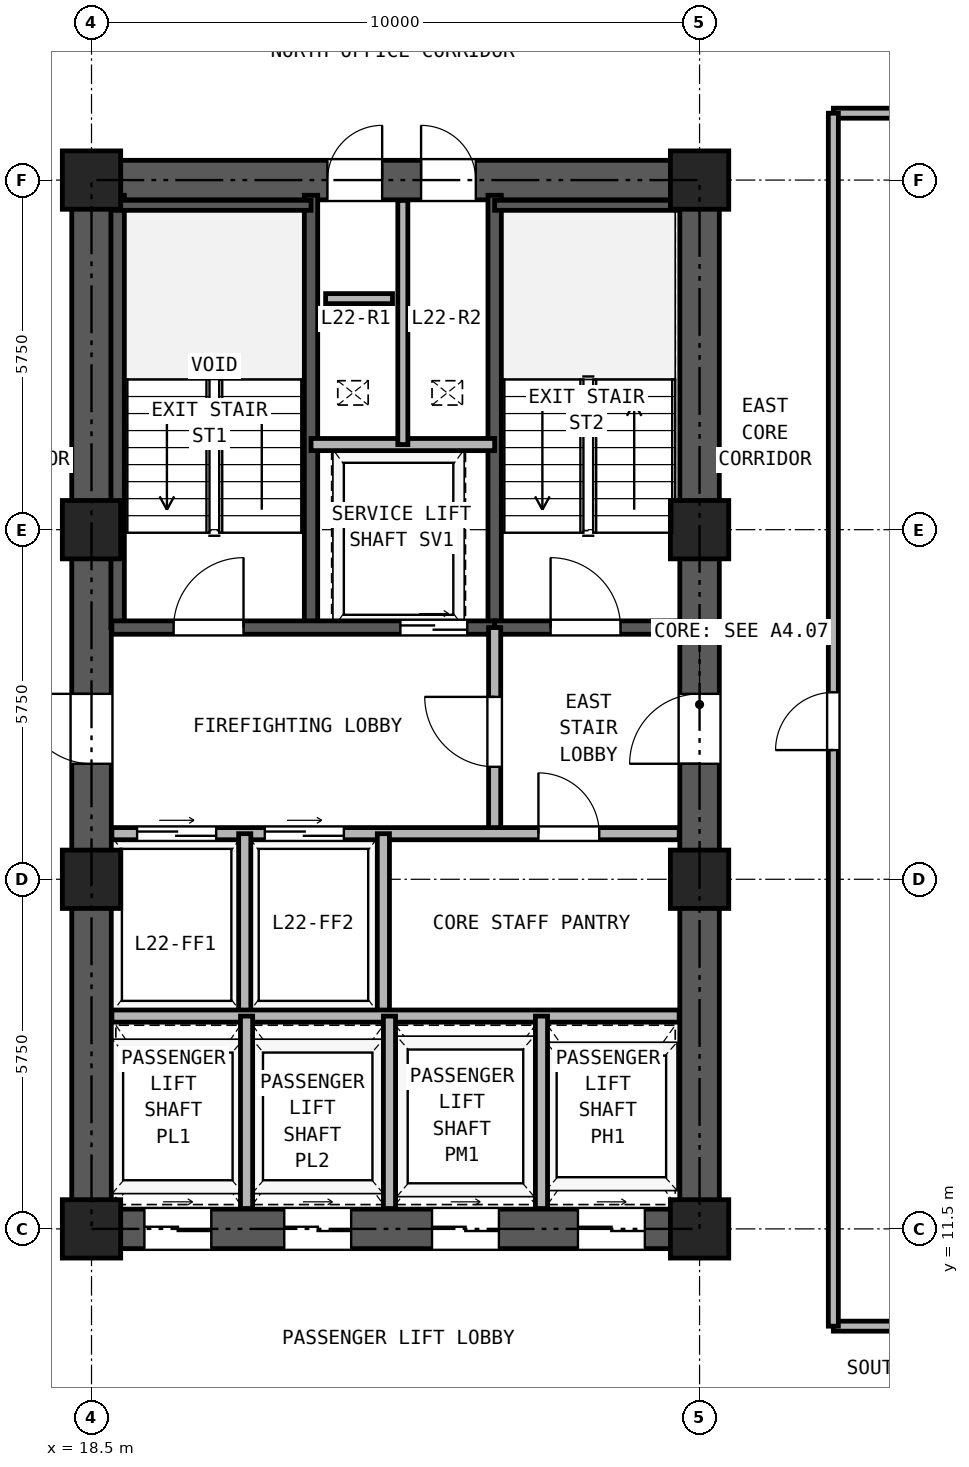
"""IFC4 building model, lengths in metres.
Left out: names, types, materials, properties, quantities, classifications, styles, units other than length and angle.
Written with IfcOpenShell. Run it as: python <this file> out.ifc"""

import sys

from ifc_helpers import new_model, si_unit, direction, frame, frame_2d, origin, origin_2d, place, context, subcontext, project, spatial, rectangle, hollow_rectangle, extrude, source, transform, mapped, element, fill, save


model = new_model("IFC4")
c1 = context("Model", 3, precision=1e-05, world=origin(), true_north=direction((0.0, 1.0)))
c2 = subcontext(c1, "Body", "Model", "MODEL_VIEW")
j1 = project(units=[si_unit("LENGTHUNIT", "METRE"), si_unit("PLANEANGLEUNIT", "RADIAN")], contexts=[c1])
p1 = place(None, origin())
s1 = spatial("IfcSite", under=j1, at=p1, CompositionType="ELEMENT")
p2 = place(p1, origin())
s2 = spatial("IfcBuilding", under=s1, at=p2, CompositionType="ELEMENT")
p3 = place(p2, frame((0.0, 0.0, 84.6)))
s3 = spatial("IfcBuildingStorey", under=s2, at=p3, CompositionType="ELEMENT", Elevation=84.6)
m1 = source(origin(), c2, "Body", "SweptSolid", [
    extrude(hollow_rectangle(XDim=0.96, YDim=0.96, WallThickness=0.06, at=origin_2d()), origin(), (0.0, 0.0, 1.0), 3.24),
])
for number, where, z_axis, x_axis in (
    (1, (18.5, 11.5, 0.0), (0.0, 0.0, 1.0), (1.0, 0.0, 0.0)),
    (2, (18.5, 17.25, 0.0), (0.0, 0.0, 1.0), (1.0, 0.0, 0.0)),
    (3, (18.5, 23.0, 0.0), (0.0, 0.0, 1.0), (1.0, 0.0, 0.0)),
    (4, (18.5, 28.75, 0.0), (0.0, 0.0, 1.0), (1.0, 0.0, 0.0)),
    (5, (28.5, 11.5, 0.0), (0.0, 0.0, 1.0), (1.0, 0.0, 0.0)),
    (6, (28.5, 17.25, 0.0), (0.0, 0.0, 1.0), (1.0, 0.0, 0.0)),
    (7, (28.5, 23.0, 0.0), (0.0, 0.0, 1.0), (1.0, 0.0, 0.0)),
    (8, (28.5, 28.75, 0.0), (0.0, 0.0, 1.0), (1.0, 0.0, 0.0)),
):
    element("IfcColumn", number, at=place(p3, frame(where, z_axis=z_axis, x_axis=x_axis)), inside=s3, PredefinedType="COLUMN", context=c2, shape_type="MappedRepresentation", body=[
        mapped(m1, transform((0.0, 0.0, 0.0), x_axis=(1.0, 0.0, 0.0), y_axis=(0.0, 1.0, 0.0), z_axis=(0.0, 0.0, 1.0), scale=1.0)),
    ])
p4 = place(p3, frame((18.175, 11.5, 0.0), z_axis=(0.0, 0.0, 1.0), x_axis=(1.0, 0.0, 0.0)))
e9 = element("IfcWall", 9, at=p4, inside=s3, PredefinedType="SHEAR", context=c2, shape_type="SweptSolid", body=[
    extrude(rectangle(XDim=10.65, YDim=0.65, at=frame_2d((5.325, 0.0))), origin(), (0.0, 0.0, 1.0), 3.24),
])
p5 = place(p4, frame((1.195, 0.0, 0.0)))
e10 = element("IfcOpeningElement", 10, at=p5, cuts=e9, PredefinedType="OPENING", context=c2, shape_type="SweptSolid", body=[
    extrude(rectangle(XDim=1.1, YDim=2.25, at=frame_2d((0.55, 1.125))), frame((0.0, 0.335, 0.0), z_axis=(0.0, -1.0, 0.0), x_axis=(1.0, 0.0, 0.0)), (0.0, 0.0, 1.0), 0.67),
])
p6 = place(p4, frame((3.495, 0.0, 0.0)))
e11 = element("IfcOpeningElement", 11, at=p6, cuts=e9, PredefinedType="OPENING", context=c2, shape_type="SweptSolid", body=[
    extrude(rectangle(XDim=1.1, YDim=2.25, at=frame_2d((0.55, 1.125))), frame((0.0, 0.335, 0.0), z_axis=(0.0, -1.0, 0.0), x_axis=(1.0, 0.0, 0.0)), (0.0, 0.0, 1.0), 0.67),
])
p7 = place(p4, frame((5.925, 0.0, 0.0)))
e12 = element("IfcOpeningElement", 12, at=p7, cuts=e9, PredefinedType="OPENING", context=c2, shape_type="SweptSolid", body=[
    extrude(rectangle(XDim=1.1, YDim=2.25, at=frame_2d((0.55, 1.125))), frame((0.0, 0.335, 0.0), z_axis=(0.0, -1.0, 0.0), x_axis=(1.0, 0.0, 0.0)), (0.0, 0.0, 1.0), 0.67),
])
p8 = place(p4, frame((8.325, 0.0, 0.0)))
e13 = element("IfcOpeningElement", 13, at=p8, cuts=e9, PredefinedType="OPENING", context=c2, shape_type="SweptSolid", body=[
    extrude(rectangle(XDim=1.1, YDim=2.25, at=frame_2d((0.55, 1.125))), frame((0.0, 0.335, 0.0), z_axis=(0.0, -1.0, 0.0), x_axis=(1.0, 0.0, 0.0)), (0.0, 0.0, 1.0), 0.67),
])
p9 = place(p3, frame((18.175, 28.75, 0.0), z_axis=(0.0, 0.0, 1.0), x_axis=(1.0, 0.0, 0.0)))
e14 = element("IfcWall", 14, at=p9, inside=s3, PredefinedType="SHEAR", context=c2, shape_type="SweptSolid", body=[
    extrude(rectangle(XDim=10.65, YDim=0.65, at=frame_2d((5.325, 0.0))), origin(), (0.0, 0.0, 1.0), 3.24),
])
p10 = place(p9, frame((4.205, 0.0, 0.0)))
e15 = element("IfcOpeningElement", 15, at=p10, cuts=e14, PredefinedType="OPENING", context=c2, shape_type="SweptSolid", body=[
    extrude(rectangle(XDim=0.9, YDim=2.05, at=frame_2d((0.45, 1.025))), frame((0.0, 0.335, 0.0), z_axis=(0.0, -1.0, 0.0), x_axis=(1.0, 0.0, 0.0)), (0.0, 0.0, 1.0), 0.67),
])
p11 = place(p9, frame((5.745, 0.0, 0.0)))
e16 = element("IfcOpeningElement", 16, at=p11, cuts=e14, PredefinedType="OPENING", context=c2, shape_type="SweptSolid", body=[
    extrude(rectangle(XDim=0.9, YDim=2.05, at=frame_2d((0.45, 1.025))), frame((0.0, 0.335, 0.0), z_axis=(0.0, -1.0, 0.0), x_axis=(1.0, 0.0, 0.0)), (0.0, 0.0, 1.0), 0.67),
])
p12 = place(p3, frame((18.5, 11.825, 0.0), z_axis=(0.0, 0.0, 1.0), x_axis=(0.0, 1.0, 0.0)))
e17 = element("IfcWall", 17, at=p12, inside=s3, PredefinedType="SHEAR", context=c2, shape_type="SweptSolid", body=[
    extrude(rectangle(XDim=16.6, YDim=0.65, at=frame_2d((8.3, 0.0))), origin(), (0.0, 0.0, 1.0), 3.24),
])
p13 = place(p12, frame((7.325, 0.0, 0.0)))
e18 = element("IfcOpeningElement", 18, at=p13, cuts=e17, PredefinedType="OPENING", context=c2, shape_type="SweptSolid", body=[
    extrude(rectangle(XDim=1.15, YDim=2.2, at=frame_2d((0.575, 1.1))), frame((0.0, 0.335, 0.0), z_axis=(0.0, -1.0, 0.0), x_axis=(1.0, 0.0, 0.0)), (0.0, 0.0, 1.0), 0.67),
])
p14 = place(p3, frame((28.5, 11.825, 0.0), z_axis=(0.0, 0.0, 1.0), x_axis=(0.0, 1.0, 0.0)))
e19 = element("IfcWall", 19, at=p14, inside=s3, PredefinedType="SHEAR", context=c2, shape_type="SweptSolid", body=[
    extrude(rectangle(XDim=16.6, YDim=0.65, at=frame_2d((8.3, 0.0))), origin(), (0.0, 0.0, 1.0), 3.24),
])
p15 = place(p14, frame((7.325, 0.0, 0.0)))
e20 = element("IfcOpeningElement", 20, at=p15, cuts=e19, PredefinedType="OPENING", context=c2, shape_type="SweptSolid", body=[
    extrude(rectangle(XDim=1.15, YDim=2.2, at=frame_2d((0.575, 1.1))), frame((0.0, 0.335, 0.0), z_axis=(0.0, -1.0, 0.0), x_axis=(1.0, 0.0, 0.0)), (0.0, 0.0, 1.0), 0.67),
])
for number, where, z_axis, x_axis in (
    (21, (18.93, 21.39, 0.0), (0.0, 0.0, 1.0), (0.0, 1.0, 0.0)),
    (22, (22.11, 21.39, 0.0), (0.0, 0.0, 1.0), (0.0, 1.0, 0.0)),
    (23, (25.13, 21.39, 0.0), (0.0, 0.0, 1.0), (0.0, 1.0, 0.0)),
):
    element("IfcWall", number, at=place(p3, frame(where, z_axis=z_axis, x_axis=x_axis)), inside=s3, PredefinedType="SOLIDWALL", context=c2, shape_type="SweptSolid", body=[
        extrude(rectangle(XDim=7.11, YDim=0.22, at=frame_2d((3.555, 0.0))), origin(), (0.0, 0.0, 1.0), 3.24),
    ])
p16 = place(p3, frame((18.835, 28.335, 0.0), z_axis=(0.0, 0.0, 1.0), x_axis=(1.0, 0.0, 0.0)))
e24 = element("IfcWall", 24, at=p16, inside=s3, PredefinedType="PARTITIONING", context=c2, shape_type="SweptSolid", body=[
    extrude(rectangle(XDim=3.275, YDim=0.165, at=frame_2d((1.638, 0.0))), origin(), (0.0, 0.0, 1.0), 3.24),
])
p17 = place(p3, frame((25.13, 28.335, 0.0), z_axis=(0.0, 0.0, 1.0), x_axis=(1.0, 0.0, 0.0)))
e25 = element("IfcWall", 25, at=p17, inside=s3, PredefinedType="PARTITIONING", context=c2, shape_type="SweptSolid", body=[
    extrude(rectangle(XDim=3.035, YDim=0.165, at=frame_2d((1.518, 0.0))), origin(), (0.0, 0.0, 1.0), 3.24),
])
p18 = place(p3, frame((18.835, 21.39, 0.0), z_axis=(0.0, 0.0, 1.0), x_axis=(1.0, 0.0, 0.0)))
e26 = element("IfcWall", 26, at=p18, inside=s3, PredefinedType="SOLIDWALL", context=c2, shape_type="SweptSolid", body=[
    extrude(rectangle(XDim=6.295, YDim=0.22, at=frame_2d((3.147, 0.0))), origin(), (0.0, 0.0, 1.0), 3.24),
])
p19 = place(p18, frame((1.015, 0.0, 0.0)))
e27 = element("IfcOpeningElement", 27, at=p19, cuts=e26, PredefinedType="OPENING", context=c2, shape_type="SweptSolid", body=[
    extrude(rectangle(XDim=1.15, YDim=2.2, at=frame_2d((0.575, 1.1))), frame((0.0, 0.12, 0.0), z_axis=(0.0, -1.0, 0.0), x_axis=(1.0, 0.0, 0.0)), (0.0, 0.0, 1.0), 0.24),
])
p20 = place(p18, frame((4.745, 0.0, 0.0)))
e28 = element("IfcOpeningElement", 28, at=p20, cuts=e26, PredefinedType="OPENING", context=c2, shape_type="SweptSolid", body=[
    extrude(rectangle(XDim=1.1, YDim=2.25, at=frame_2d((0.55, 1.125))), frame((0.0, 0.12, 0.0), z_axis=(0.0, -1.0, 0.0), x_axis=(1.0, 0.0, 0.0)), (0.0, 0.0, 1.0), 0.24),
])
p21 = place(p3, frame((25.13, 21.39, 0.0), z_axis=(0.0, 0.0, 1.0), x_axis=(1.0, 0.0, 0.0)))
e29 = element("IfcWall", 29, at=p21, inside=s3, PredefinedType="SOLIDWALL", context=c2, shape_type="SweptSolid", body=[
    extrude(rectangle(XDim=3.035, YDim=0.22, at=frame_2d((1.518, 0.0))), origin(), (0.0, 0.0, 1.0), 3.24),
])
p22 = place(p21, frame((0.92, 0.0, 0.0)))
e30 = element("IfcOpeningElement", 30, at=p22, cuts=e29, PredefinedType="OPENING", context=c2, shape_type="SweptSolid", body=[
    extrude(rectangle(XDim=1.15, YDim=2.2, at=frame_2d((0.575, 1.1))), frame((0.0, 0.12, 0.0), z_axis=(0.0, -1.0, 0.0), x_axis=(1.0, 0.0, 0.0)), (0.0, 0.0, 1.0), 0.24),
])
p23 = place(p3, frame((22.11, 24.4, 0.0), z_axis=(0.0, 0.0, 1.0), x_axis=(1.0, 0.0, 0.0)))
e31 = element("IfcWall", 31, at=p23, inside=s3, PredefinedType="PARTITIONING", context=c2, shape_type="SweptSolid", body=[
    extrude(rectangle(XDim=3.02, YDim=0.2, at=frame_2d((1.51, 0.0))), origin(), (0.0, 0.0, 1.0), 3.24),
])
p24 = place(p3, frame((23.62, 24.4, 0.0), z_axis=(0.0, 0.0, 1.0), x_axis=(0.0, 1.0, 0.0)))
e32 = element("IfcWall", 32, at=p24, inside=s3, PredefinedType="PARTITIONING", context=c2, shape_type="SweptSolid", body=[
    extrude(rectangle(XDim=4.015, YDim=0.165, at=frame_2d((2.008, 0.0))), origin(), (0.0, 0.0, 1.0), 3.24),
])
p25 = place(p3, frame((25.13, 18.0, 0.0), z_axis=(0.0, 0.0, 1.0), x_axis=(0.0, 1.0, 0.0)))
e33 = element("IfcWall", 33, at=p25, inside=s3, PredefinedType="PARTITIONING", context=c2, shape_type="SweptSolid", body=[
    extrude(rectangle(XDim=3.39, YDim=0.2, at=frame_2d((1.695, 0.0))), origin(), (0.0, 0.0, 1.0), 3.24),
])
p26 = place(p25, frame((1.1, 0.0, 0.0)))
e34 = element("IfcOpeningElement", 34, at=p26, cuts=e33, PredefinedType="OPENING", context=c2, shape_type="SweptSolid", body=[
    extrude(rectangle(XDim=1.15, YDim=2.2, at=frame_2d((0.575, 1.1))), frame((0.0, 0.11, 0.0), z_axis=(0.0, -1.0, 0.0), x_axis=(1.0, 0.0, 0.0)), (0.0, 0.0, 1.0), 0.22),
])
p27 = place(p3, frame((18.835, 18.0, 0.0), z_axis=(0.0, 0.0, 1.0), x_axis=(1.0, 0.0, 0.0)))
e35 = element("IfcWall", 35, at=p27, inside=s3, PredefinedType="PARTITIONING", context=c2, shape_type="SweptSolid", body=[
    extrude(rectangle(XDim=9.33, YDim=0.2, at=frame_2d((4.665, 0.0))), origin(), (0.0, 0.0, 1.0), 3.24),
])
p28 = place(p27, frame((0.415, 0.0, 0.0)))
e36 = element("IfcOpeningElement", 36, at=p28, cuts=e35, PredefinedType="OPENING", context=c2, shape_type="SweptSolid", body=[
    extrude(rectangle(XDim=1.3, YDim=2.3, at=frame_2d((0.65, 1.15))), frame((0.0, 0.11, 0.0), z_axis=(0.0, -1.0, 0.0), x_axis=(1.0, 0.0, 0.0)), (0.0, 0.0, 1.0), 0.22),
])
p29 = place(p27, frame((2.515, 0.0, 0.0)))
e37 = element("IfcOpeningElement", 37, at=p29, cuts=e35, PredefinedType="OPENING", context=c2, shape_type="SweptSolid", body=[
    extrude(rectangle(XDim=1.3, YDim=2.3, at=frame_2d((0.65, 1.15))), frame((0.0, 0.11, 0.0), z_axis=(0.0, -1.0, 0.0), x_axis=(1.0, 0.0, 0.0)), (0.0, 0.0, 1.0), 0.22),
])
p30 = place(p27, frame((7.015, 0.0, 0.0)))
e38 = element("IfcOpeningElement", 38, at=p30, cuts=e35, PredefinedType="OPENING", context=c2, shape_type="SweptSolid", body=[
    extrude(rectangle(XDim=1.0, YDim=2.15, at=frame_2d((0.5, 1.075))), frame((0.0, 0.11, 0.0), z_axis=(0.0, -1.0, 0.0), x_axis=(1.0, 0.0, 0.0)), (0.0, 0.0, 1.0), 0.22),
])
for number, where, z_axis, x_axis in (
    (39, (21.02, 15.0, 0.0), (0.0, 0.0, 1.0), (0.0, 1.0, 0.0)),
    (40, (23.3, 15.0, 0.0), (0.0, 0.0, 1.0), (0.0, 1.0, 0.0)),
):
    element("IfcWall", number, at=place(p3, frame(where, z_axis=z_axis, x_axis=x_axis)), inside=s3, PredefinedType="PARTITIONING", context=c2, shape_type="SweptSolid", body=[
        extrude(rectangle(XDim=3.0, YDim=0.2, at=frame_2d((1.5, 0.0))), origin(), (0.0, 0.0, 1.0), 3.24),
    ])
p31 = place(p3, frame((18.835, 15.0, 0.0), z_axis=(0.0, 0.0, 1.0), x_axis=(1.0, 0.0, 0.0)))
e41 = element("IfcWall", 41, at=p31, inside=s3, PredefinedType="PARTITIONING", context=c2, shape_type="SweptSolid", body=[
    extrude(rectangle(XDim=9.33, YDim=0.2, at=frame_2d((4.665, 0.0))), origin(), (0.0, 0.0, 1.0), 3.24),
])
for number, where, z_axis, x_axis in (
    (42, (21.05, 11.835, 0.0), (0.0, 0.0, 1.0), (0.0, 1.0, 0.0)),
    (43, (23.4, 11.835, 0.0), (0.0, 0.0, 1.0), (0.0, 1.0, 0.0)),
    (44, (25.9, 11.835, 0.0), (0.0, 0.0, 1.0), (0.0, 1.0, 0.0)),
):
    element("IfcWall", number, at=place(p3, frame(where, z_axis=z_axis, x_axis=x_axis)), inside=s3, PredefinedType="PARTITIONING", context=c2, shape_type="SweptSolid", body=[
        extrude(rectangle(XDim=3.165, YDim=0.2, at=frame_2d((1.583, 0.0))), origin(), (0.0, 0.0, 1.0), 3.24),
    ])
for number, where, z_axis, x_axis in (
    (45, (30.7, 9.9, 0.0), (0.0, 0.0, 1.0), (1.0, 0.0, 0.0)),
    (46, (30.7, 29.85, 0.0), (0.0, 0.0, 1.0), (1.0, 0.0, 0.0)),
):
    element("IfcWall", number, at=place(p3, frame(where, z_axis=z_axis, x_axis=x_axis)), inside=s3, PredefinedType="PARTITIONING", context=c2, shape_type="SweptSolid", body=[
        extrude(rectangle(XDim=9.7, YDim=0.165, at=frame_2d((4.85, 0.0))), origin(), (0.0, 0.0, 1.0), 3.24),
    ])
p32 = place(p3, frame((30.7, 9.9, 0.0), z_axis=(0.0, 0.0, 1.0), x_axis=(0.0, 1.0, 0.0)))
e47 = element("IfcWall", 47, at=p32, inside=s3, PredefinedType="PARTITIONING", context=c2, shape_type="SweptSolid", body=[
    extrude(rectangle(XDim=19.95, YDim=0.165, at=frame_2d((9.975, 0.0))), origin(), (0.0, 0.0, 1.0), 3.24),
])
p33 = place(p32, frame((9.475, 0.0, 0.0)))
e48 = element("IfcOpeningElement", 48, at=p33, cuts=e47, PredefinedType="OPENING", context=c2, shape_type="SweptSolid", body=[
    extrude(rectangle(XDim=0.95, YDim=2.15, at=frame_2d((0.475, 1.075))), frame((0.0, 0.093, 0.0), z_axis=(0.0, -1.0, 0.0), x_axis=(1.0, 0.0, 0.0)), (0.0, 0.0, 1.0), 0.185),
])
p34 = place(p3, frame((22.35, 26.8, 0.0), z_axis=(0.0, 0.0, 1.0), x_axis=(1.0, 0.0, 0.0)))
e49 = element("IfcWall", 49, at=p34, inside=s3, PredefinedType="PARTITIONING", context=c2, shape_type="SweptSolid", body=[
    extrude(rectangle(XDim=1.1, YDim=0.165, at=frame_2d((0.55, 0.0))), origin(), (0.0, 0.0, 1.0), 3.24),
])
p35 = place(p19, frame((1.15, 0.0, 0.0), z_axis=(0.0, 0.0, 1.0), x_axis=(-1.0, 0.0, 0.0)))
e50 = element("IfcDoor", 50, at=p35, inside=s3, OperationType="SINGLE_SWING_RIGHT", PredefinedType="DOOR", context=c2, shape_type="SweptSolid", body=[
    extrude(rectangle(XDim=1.15, YDim=2.2, at=frame_2d((0.575, 1.1))), frame((0.0, 0.025, 0.0), z_axis=(0.0, -1.0, 0.0), x_axis=(1.0, 0.0, 0.0)), (0.0, 0.0, 1.0), 0.05),
])
fill(e27, e50)
p36 = place(p22, frame((1.15, 0.0, 0.0), z_axis=(0.0, 0.0, 1.0), x_axis=(-1.0, 0.0, 0.0)))
e51 = element("IfcDoor", 51, at=p36, inside=s3, OperationType="SINGLE_SWING_LEFT", PredefinedType="DOOR", context=c2, shape_type="SweptSolid", body=[
    extrude(rectangle(XDim=1.15, YDim=2.2, at=frame_2d((0.575, 1.1))), frame((0.0, 0.025, 0.0), z_axis=(0.0, -1.0, 0.0), x_axis=(1.0, 0.0, 0.0)), (0.0, 0.0, 1.0), 0.05),
])
fill(e30, e51)
p37 = place(p20, frame((1.1, 0.0, 0.0), z_axis=(0.0, 0.0, 1.0), x_axis=(-1.0, 0.0, 0.0)))
e52 = element("IfcDoor", 52, at=p37, inside=s3, OperationType="DOUBLE_DOOR_SLIDING", PredefinedType="DOOR", context=c2, shape_type="SweptSolid", body=[
    extrude(rectangle(XDim=1.1, YDim=2.25, at=frame_2d((0.55, 1.125))), frame((0.0, 0.025, 0.0), z_axis=(0.0, -1.0, 0.0), x_axis=(1.0, 0.0, 0.0)), (0.0, 0.0, 1.0), 0.05),
])
fill(e28, e52)
p38 = place(p26, origin())
e53 = element("IfcDoor", 53, at=p38, inside=s3, OperationType="SINGLE_SWING_RIGHT", PredefinedType="DOOR", context=c2, shape_type="SweptSolid", body=[
    extrude(rectangle(XDim=1.15, YDim=2.2, at=frame_2d((0.575, 1.1))), frame((0.0, 0.025, 0.0), z_axis=(0.0, -1.0, 0.0), x_axis=(1.0, 0.0, 0.0)), (0.0, 0.0, 1.0), 0.05),
])
fill(e34, e53)
p39 = place(p28, origin())
e54 = element("IfcDoor", 54, at=p39, inside=s3, OperationType="DOUBLE_DOOR_SLIDING", PredefinedType="DOOR", context=c2, shape_type="SweptSolid", body=[
    extrude(rectangle(XDim=1.3, YDim=2.3, at=frame_2d((0.65, 1.15))), frame((0.0, 0.025, 0.0), z_axis=(0.0, -1.0, 0.0), x_axis=(1.0, 0.0, 0.0)), (0.0, 0.0, 1.0), 0.05),
])
fill(e36, e54)
p40 = place(p29, origin())
e55 = element("IfcDoor", 55, at=p40, inside=s3, OperationType="DOUBLE_DOOR_SLIDING", PredefinedType="DOOR", context=c2, shape_type="SweptSolid", body=[
    extrude(rectangle(XDim=1.3, YDim=2.3, at=frame_2d((0.65, 1.15))), frame((0.0, 0.025, 0.0), z_axis=(0.0, -1.0, 0.0), x_axis=(1.0, 0.0, 0.0)), (0.0, 0.0, 1.0), 0.05),
])
fill(e37, e55)
p41 = place(p30, frame((1.0, 0.0, 0.0), z_axis=(0.0, 0.0, 1.0), x_axis=(-1.0, 0.0, 0.0)))
e56 = element("IfcDoor", 56, at=p41, inside=s3, OperationType="SINGLE_SWING_LEFT", PredefinedType="DOOR", context=c2, shape_type="SweptSolid", body=[
    extrude(rectangle(XDim=1.0, YDim=2.15, at=frame_2d((0.5, 1.075))), frame((0.0, 0.025, 0.0), z_axis=(0.0, -1.0, 0.0), x_axis=(1.0, 0.0, 0.0)), (0.0, 0.0, 1.0), 0.05),
])
fill(e38, e56)
p42 = place(p13, frame((1.15, 0.0, 0.0), z_axis=(0.0, 0.0, 1.0), x_axis=(-1.0, 0.0, 0.0)))
e57 = element("IfcDoor", 57, at=p42, inside=s3, OperationType="SINGLE_SWING_RIGHT", PredefinedType="DOOR", context=c2, shape_type="SweptSolid", body=[
    extrude(rectangle(XDim=1.15, YDim=2.2, at=frame_2d((0.575, 1.1))), frame((0.0, 0.025, 0.0), z_axis=(0.0, -1.0, 0.0), x_axis=(1.0, 0.0, 0.0)), (0.0, 0.0, 1.0), 0.05),
])
fill(e18, e57)
p43 = place(p15, origin())
e58 = element("IfcDoor", 58, at=p43, inside=s3, OperationType="SINGLE_SWING_LEFT", PredefinedType="DOOR", context=c2, shape_type="SweptSolid", body=[
    extrude(rectangle(XDim=1.15, YDim=2.2, at=frame_2d((0.575, 1.1))), frame((0.0, 0.025, 0.0), z_axis=(0.0, -1.0, 0.0), x_axis=(1.0, 0.0, 0.0)), (0.0, 0.0, 1.0), 0.05),
])
fill(e20, e58)
p44 = place(p10, origin())
e59 = element("IfcDoor", 59, at=p44, inside=s3, OperationType="SINGLE_SWING_RIGHT", PredefinedType="DOOR", context=c2, shape_type="SweptSolid", body=[
    extrude(rectangle(XDim=0.9, YDim=2.05, at=frame_2d((0.45, 1.025))), frame((0.0, 0.025, 0.0), z_axis=(0.0, -1.0, 0.0), x_axis=(1.0, 0.0, 0.0)), (0.0, 0.0, 1.0), 0.05),
])
fill(e15, e59)
p45 = place(p11, origin())
e60 = element("IfcDoor", 60, at=p45, inside=s3, OperationType="SINGLE_SWING_LEFT", PredefinedType="DOOR", context=c2, shape_type="SweptSolid", body=[
    extrude(rectangle(XDim=0.9, YDim=2.05, at=frame_2d((0.45, 1.025))), frame((0.0, 0.025, 0.0), z_axis=(0.0, -1.0, 0.0), x_axis=(1.0, 0.0, 0.0)), (0.0, 0.0, 1.0), 0.05),
])
fill(e16, e60)
p46 = place(p5, frame((1.1, 0.0, 0.0), z_axis=(0.0, 0.0, 1.0), x_axis=(-1.0, 0.0, 0.0)))
e61 = element("IfcDoor", 61, at=p46, inside=s3, OperationType="DOUBLE_DOOR_SLIDING", PredefinedType="DOOR", context=c2, shape_type="SweptSolid", body=[
    extrude(rectangle(XDim=1.1, YDim=2.25, at=frame_2d((0.55, 1.125))), frame((0.0, 0.025, 0.0), z_axis=(0.0, -1.0, 0.0), x_axis=(1.0, 0.0, 0.0)), (0.0, 0.0, 1.0), 0.05),
])
fill(e10, e61)
p47 = place(p6, frame((1.1, 0.0, 0.0), z_axis=(0.0, 0.0, 1.0), x_axis=(-1.0, 0.0, 0.0)))
e62 = element("IfcDoor", 62, at=p47, inside=s3, OperationType="DOUBLE_DOOR_SLIDING", PredefinedType="DOOR", context=c2, shape_type="SweptSolid", body=[
    extrude(rectangle(XDim=1.1, YDim=2.25, at=frame_2d((0.55, 1.125))), frame((0.0, 0.025, 0.0), z_axis=(0.0, -1.0, 0.0), x_axis=(1.0, 0.0, 0.0)), (0.0, 0.0, 1.0), 0.05),
])
fill(e11, e62)
p48 = place(p7, frame((1.1, 0.0, 0.0), z_axis=(0.0, 0.0, 1.0), x_axis=(-1.0, 0.0, 0.0)))
e63 = element("IfcDoor", 63, at=p48, inside=s3, OperationType="DOUBLE_DOOR_SLIDING", PredefinedType="DOOR", context=c2, shape_type="SweptSolid", body=[
    extrude(rectangle(XDim=1.1, YDim=2.25, at=frame_2d((0.55, 1.125))), frame((0.0, 0.025, 0.0), z_axis=(0.0, -1.0, 0.0), x_axis=(1.0, 0.0, 0.0)), (0.0, 0.0, 1.0), 0.05),
])
fill(e12, e63)
p49 = place(p8, frame((1.1, 0.0, 0.0), z_axis=(0.0, 0.0, 1.0), x_axis=(-1.0, 0.0, 0.0)))
e64 = element("IfcDoor", 64, at=p49, inside=s3, OperationType="DOUBLE_DOOR_SLIDING", PredefinedType="DOOR", context=c2, shape_type="SweptSolid", body=[
    extrude(rectangle(XDim=1.1, YDim=2.25, at=frame_2d((0.55, 1.125))), frame((0.0, 0.025, 0.0), z_axis=(0.0, -1.0, 0.0), x_axis=(1.0, 0.0, 0.0)), (0.0, 0.0, 1.0), 0.05),
])
fill(e13, e64)
p50 = place(p33, origin())
e65 = element("IfcDoor", 65, at=p50, inside=s3, OperationType="SINGLE_SWING_LEFT", PredefinedType="DOOR", context=c2, shape_type="SweptSolid", body=[
    extrude(rectangle(XDim=0.95, YDim=2.15, at=frame_2d((0.475, 1.075))), frame((0.0, 0.025, 0.0), z_axis=(0.0, -1.0, 0.0), x_axis=(1.0, 0.0, 0.0)), (0.0, 0.0, 1.0), 0.05),
])
fill(e48, e65)
save(model, sys.argv[1])
